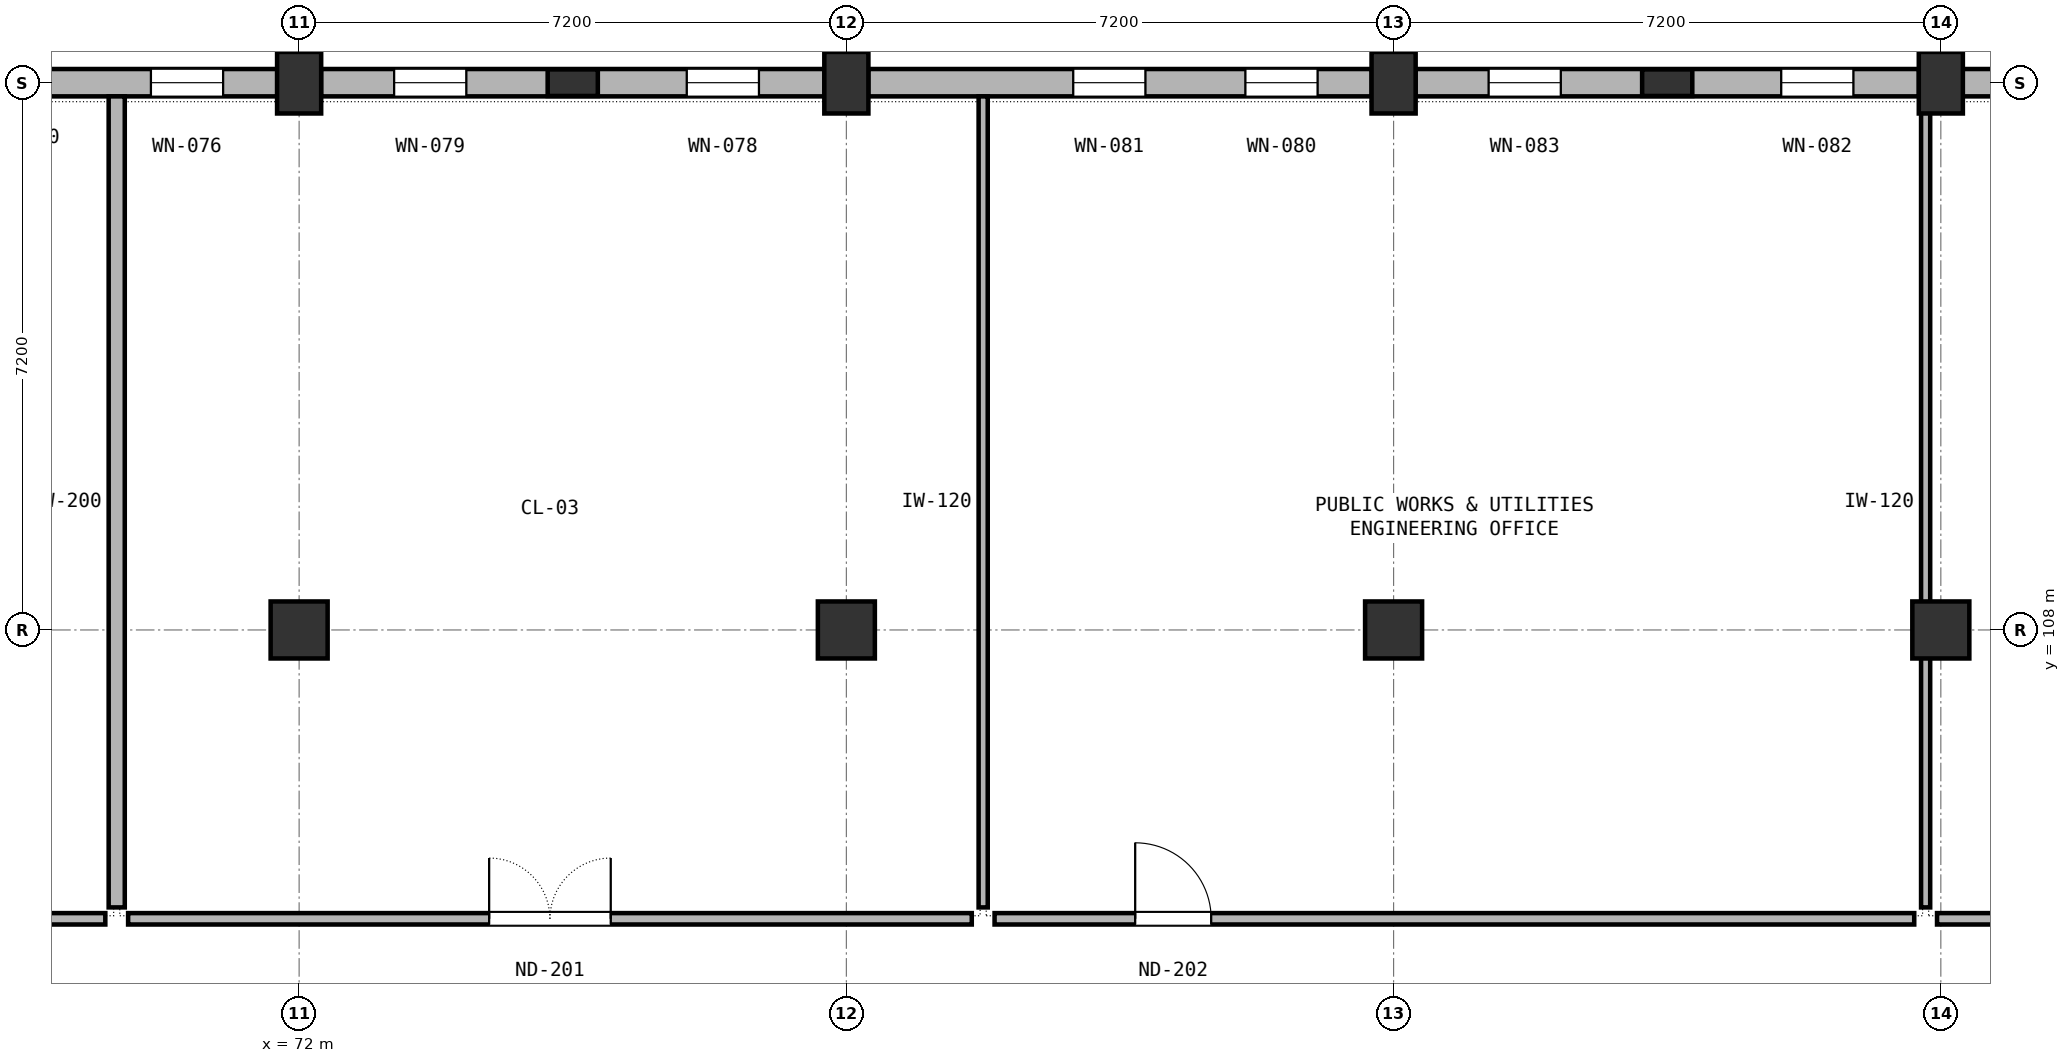
"""IFC4 building model, lengths in metres.
Left out: names, types, materials, properties, quantities, classifications, styles, units other than length and angle.
Written with IfcOpenShell. Run it as: python <this file> out.ifc"""

import sys

from ifc_helpers import new_model, si_unit, direction, frame, frame_2d, origin, origin_2d, place, context, subcontext, project, spatial, rectangle, extrude, element, fill, save


model = new_model("IFC4")
c1 = context("Model", 3, precision=1e-05, world=origin(), true_north=direction((0.0, 1.0)))
c2 = subcontext(c1, "Body", "Model", "MODEL_VIEW")
j1 = project(units=[si_unit("LENGTHUNIT", "METRE"), si_unit("PLANEANGLEUNIT", "RADIAN")], contexts=[c1])
p1 = place(None, origin())
s1 = spatial("IfcSite", under=j1, at=p1, CompositionType="ELEMENT")
p2 = place(p1, origin())
s2 = spatial("IfcBuilding", under=s1, at=p2, CompositionType="ELEMENT")
p3 = place(p2, frame((0.0, 0.0, 14.4)))
s3 = spatial("IfcBuildingStorey", under=s2, at=p3, CompositionType="ELEMENT", Elevation=14.4)
p4 = place(p3, frame((72.0, 108.0, 0.0), z_axis=(0.0, 0.0, 1.0), x_axis=(1.0, 0.0, 0.0)))
e1 = element("IfcColumn", 1, at=p4, inside=s3, PredefinedType="COLUMN", context=c2, shape_type="SweptSolid", body=[
    extrude(rectangle(XDim=0.75, YDim=0.75, at=origin_2d()), origin(), (0.0, 0.0, 1.0), 4.2),
])
p5 = place(p3, frame((72.0, 115.2, 0.0), z_axis=(0.0, 0.0, 1.0), x_axis=(1.0, 0.0, 0.0)))
e2 = element("IfcColumn", 2, at=p5, inside=s3, PredefinedType="COLUMN", context=c2, shape_type="SweptSolid", body=[
    extrude(rectangle(XDim=0.58, YDim=0.81, at=origin_2d()), origin(), (0.0, 0.0, 1.0), 4.2),
])
p6 = place(p3, frame((79.2, 108.0, 0.0), z_axis=(0.0, 0.0, 1.0), x_axis=(1.0, 0.0, 0.0)))
e3 = element("IfcColumn", 3, at=p6, inside=s3, PredefinedType="COLUMN", context=c2, shape_type="SweptSolid", body=[
    extrude(rectangle(XDim=0.75, YDim=0.75, at=origin_2d()), origin(), (0.0, 0.0, 1.0), 4.2),
])
p7 = place(p3, frame((79.2, 115.2, 0.0), z_axis=(0.0, 0.0, 1.0), x_axis=(1.0, 0.0, 0.0)))
e4 = element("IfcColumn", 4, at=p7, inside=s3, PredefinedType="COLUMN", context=c2, shape_type="SweptSolid", body=[
    extrude(rectangle(XDim=0.58, YDim=0.81, at=origin_2d()), origin(), (0.0, 0.0, 1.0), 4.2),
])
p8 = place(p3, frame((86.4, 108.0, 0.0), z_axis=(0.0, 0.0, 1.0), x_axis=(1.0, 0.0, 0.0)))
e5 = element("IfcColumn", 5, at=p8, inside=s3, PredefinedType="COLUMN", context=c2, shape_type="SweptSolid", body=[
    extrude(rectangle(XDim=0.75, YDim=0.75, at=origin_2d()), origin(), (0.0, 0.0, 1.0), 4.2),
])
p9 = place(p3, frame((86.4, 115.2, 0.0), z_axis=(0.0, 0.0, 1.0), x_axis=(1.0, 0.0, 0.0)))
e6 = element("IfcColumn", 6, at=p9, inside=s3, PredefinedType="COLUMN", context=c2, shape_type="SweptSolid", body=[
    extrude(rectangle(XDim=0.58, YDim=0.81, at=origin_2d()), origin(), (0.0, 0.0, 1.0), 4.2),
])
p10 = place(p3, frame((93.6, 108.0, 0.0), z_axis=(0.0, 0.0, 1.0), x_axis=(1.0, 0.0, 0.0)))
e7 = element("IfcColumn", 7, at=p10, inside=s3, PredefinedType="COLUMN", context=c2, shape_type="SweptSolid", body=[
    extrude(rectangle(XDim=0.75, YDim=0.75, at=origin_2d()), origin(), (0.0, 0.0, 1.0), 4.2),
])
p11 = place(p3, frame((93.6, 115.2, 0.0), z_axis=(0.0, 0.0, 1.0), x_axis=(1.0, 0.0, 0.0)))
e8 = element("IfcColumn", 8, at=p11, inside=s3, PredefinedType="COLUMN", context=c2, shape_type="SweptSolid", body=[
    extrude(rectangle(XDim=0.58, YDim=0.81, at=origin_2d()), origin(), (0.0, 0.0, 1.0), 4.2),
])
for number, where, z_axis, x_axis in (
    (9, (75.6, 115.2, 0.0), (0.0, 0.0, 1.0), (1.0, 0.0, 0.0)),
    (10, (90.0, 115.2, 0.0), (0.0, 0.0, 1.0), (1.0, 0.0, 0.0)),
):
    element("IfcColumn", number, at=place(p3, frame(where, z_axis=z_axis, x_axis=x_axis)), inside=s3, PredefinedType="PILASTER", context=c2, shape_type="SweptSolid", body=[
        extrude(rectangle(XDim=0.66, YDim=0.35, at=origin_2d()), origin(), (0.0, 0.0, 1.0), 4.2),
    ])
p12 = place(p3, frame((71.712, 115.2, 0.0), z_axis=(0.0, 0.0, 1.0), x_axis=(-1.0, 0.0, 0.0)))
e11 = element("IfcWall", 11, at=p12, inside=s3, PredefinedType="SOLIDWALL", context=c2, shape_type="SweptSolid", body=[
    extrude(rectangle(XDim=6.624, YDim=0.36, at=frame_2d((3.312, 0.0))), origin(), (0.0, 0.0, 1.0), 3.04),
])
p13 = place(p12, frame((0.712, 0.0, 0.7)))
e12 = element("IfcOpeningElement", 12, at=p13, cuts=e11, PredefinedType="OPENING", context=c2, shape_type="SweptSolid", body=[
    extrude(rectangle(XDim=0.95, YDim=2.14, at=frame_2d((0.475, 1.07))), frame((0.0, 0.19, 0.0), z_axis=(0.0, -1.0, 0.0), x_axis=(1.0, 0.0, 0.0)), (0.0, 0.0, 1.0), 0.38),
])
p14 = place(p12, frame((4.562, 0.0, 0.7)))
e13 = element("IfcOpeningElement", 13, at=p14, cuts=e11, PredefinedType="OPENING", context=c2, shape_type="SweptSolid", body=[
    extrude(rectangle(XDim=0.95, YDim=2.14, at=frame_2d((0.475, 1.07))), frame((0.0, 0.19, 0.0), z_axis=(0.0, -1.0, 0.0), x_axis=(1.0, 0.0, 0.0)), (0.0, 0.0, 1.0), 0.38),
])
p15 = place(p3, frame((78.912, 115.2, 0.0), z_axis=(0.0, 0.0, 1.0), x_axis=(-1.0, 0.0, 0.0)))
e14 = element("IfcWall", 14, at=p15, inside=s3, PredefinedType="SOLIDWALL", context=c2, shape_type="SweptSolid", body=[
    extrude(rectangle(XDim=6.624, YDim=0.36, at=frame_2d((3.312, 0.0))), origin(), (0.0, 0.0, 1.0), 3.04),
])
p16 = place(p15, frame((0.862, 0.0, 0.7)))
e15 = element("IfcOpeningElement", 15, at=p16, cuts=e14, PredefinedType="OPENING", context=c2, shape_type="SweptSolid", body=[
    extrude(rectangle(XDim=0.95, YDim=2.14, at=frame_2d((0.475, 1.07))), frame((0.0, 0.19, 0.0), z_axis=(0.0, -1.0, 0.0), x_axis=(1.0, 0.0, 0.0)), (0.0, 0.0, 1.0), 0.38),
])
p17 = place(p15, frame((4.712, 0.0, 0.7)))
e16 = element("IfcOpeningElement", 16, at=p17, cuts=e14, PredefinedType="OPENING", context=c2, shape_type="SweptSolid", body=[
    extrude(rectangle(XDim=0.95, YDim=2.14, at=frame_2d((0.475, 1.07))), frame((0.0, 0.19, 0.0), z_axis=(0.0, -1.0, 0.0), x_axis=(1.0, 0.0, 0.0)), (0.0, 0.0, 1.0), 0.38),
])
p18 = place(p3, frame((86.112, 115.2, 0.0), z_axis=(0.0, 0.0, 1.0), x_axis=(-1.0, 0.0, 0.0)))
e17 = element("IfcWall", 17, at=p18, inside=s3, PredefinedType="SOLIDWALL", context=c2, shape_type="SweptSolid", body=[
    extrude(rectangle(XDim=6.624, YDim=0.36, at=frame_2d((3.312, 0.0))), origin(), (0.0, 0.0, 1.0), 3.04),
])
p19 = place(p18, frame((0.712, 0.0, 0.7)))
e18 = element("IfcOpeningElement", 18, at=p19, cuts=e17, PredefinedType="OPENING", context=c2, shape_type="SweptSolid", body=[
    extrude(rectangle(XDim=0.95, YDim=2.14, at=frame_2d((0.475, 1.07))), frame((0.0, 0.19, 0.0), z_axis=(0.0, -1.0, 0.0), x_axis=(1.0, 0.0, 0.0)), (0.0, 0.0, 1.0), 0.38),
])
p20 = place(p18, frame((2.977, 0.0, 0.7)))
e19 = element("IfcOpeningElement", 19, at=p20, cuts=e17, PredefinedType="OPENING", context=c2, shape_type="SweptSolid", body=[
    extrude(rectangle(XDim=0.95, YDim=2.14, at=frame_2d((0.475, 1.07))), frame((0.0, 0.19, 0.0), z_axis=(0.0, -1.0, 0.0), x_axis=(1.0, 0.0, 0.0)), (0.0, 0.0, 1.0), 0.38),
])
p21 = place(p3, frame((93.312, 115.2, 0.0), z_axis=(0.0, 0.0, 1.0), x_axis=(-1.0, 0.0, 0.0)))
e20 = element("IfcWall", 20, at=p21, inside=s3, PredefinedType="SOLIDWALL", context=c2, shape_type="SweptSolid", body=[
    extrude(rectangle(XDim=6.624, YDim=0.36, at=frame_2d((3.312, 0.0))), origin(), (0.0, 0.0, 1.0), 3.04),
])
p22 = place(p21, frame((0.862, 0.0, 0.7)))
e21 = element("IfcOpeningElement", 21, at=p22, cuts=e20, PredefinedType="OPENING", context=c2, shape_type="SweptSolid", body=[
    extrude(rectangle(XDim=0.95, YDim=2.14, at=frame_2d((0.475, 1.07))), frame((0.0, 0.19, 0.0), z_axis=(0.0, -1.0, 0.0), x_axis=(1.0, 0.0, 0.0)), (0.0, 0.0, 1.0), 0.38),
])
p23 = place(p21, frame((4.712, 0.0, 0.7)))
e22 = element("IfcOpeningElement", 22, at=p23, cuts=e20, PredefinedType="OPENING", context=c2, shape_type="SweptSolid", body=[
    extrude(rectangle(XDim=0.95, YDim=2.14, at=frame_2d((0.475, 1.07))), frame((0.0, 0.19, 0.0), z_axis=(0.0, -1.0, 0.0), x_axis=(1.0, 0.0, 0.0)), (0.0, 0.0, 1.0), 0.38),
])
p24 = place(p3, frame((100.512, 115.2, 0.0), z_axis=(0.0, 0.0, 1.0), x_axis=(-1.0, 0.0, 0.0)))
e23 = element("IfcWall", 23, at=p24, inside=s3, PredefinedType="SOLIDWALL", context=c2, shape_type="SweptSolid", body=[
    extrude(rectangle(XDim=6.624, YDim=0.36, at=frame_2d((3.312, 0.0))), origin(), (0.0, 0.0, 1.0), 3.04),
])
p25 = place(p24, frame((0.712, 0.0, 0.7)))
e24 = element("IfcOpeningElement", 24, at=p25, cuts=e23, PredefinedType="OPENING", context=c2, shape_type="SweptSolid", body=[
    extrude(rectangle(XDim=0.95, YDim=2.14, at=frame_2d((0.475, 1.07))), frame((0.0, 0.19, 0.0), z_axis=(0.0, -1.0, 0.0), x_axis=(1.0, 0.0, 0.0)), (0.0, 0.0, 1.0), 0.38),
])
p26 = place(p24, frame((4.562, 0.0, 0.7)))
e25 = element("IfcOpeningElement", 25, at=p26, cuts=e23, PredefinedType="OPENING", context=c2, shape_type="SweptSolid", body=[
    extrude(rectangle(XDim=0.95, YDim=2.14, at=frame_2d((0.475, 1.07))), frame((0.0, 0.19, 0.0), z_axis=(0.0, -1.0, 0.0), x_axis=(1.0, 0.0, 0.0)), (0.0, 0.0, 1.0), 0.38),
])
p27 = place(p3, frame((59.15, 104.2, 0.0), z_axis=(0.0, 0.0, 1.0), x_axis=(1.0, 0.0, 0.0)))
e26 = element("IfcWall", 26, at=p27, inside=s3, PredefinedType="PARTITIONING", context=c2, shape_type="SweptSolid", body=[
    extrude(rectangle(XDim=10.3, YDim=0.15, at=frame_2d((5.15, 0.0))), origin(), (0.0, 0.0, 1.0), 3.08),
])
p28 = place(p27, frame((1.85, 0.0, 0.0)))
e27 = element("IfcOpeningElement", 27, at=p28, cuts=e26, PredefinedType="OPENING", context=c2, shape_type="SweptSolid", body=[
    extrude(rectangle(XDim=1.0, YDim=2.15, at=frame_2d((0.5, 1.075))), frame((0.0, 0.085, 0.0), z_axis=(0.0, -1.0, 0.0), x_axis=(1.0, 0.0, 0.0)), (0.0, 0.0, 1.0), 0.17),
])
p29 = place(p3, frame((69.75, 104.2, 0.0), z_axis=(0.0, 0.0, 1.0), x_axis=(1.0, 0.0, 0.0)))
e28 = element("IfcWall", 28, at=p29, inside=s3, PredefinedType="PARTITIONING", context=c2, shape_type="SweptSolid", body=[
    extrude(rectangle(XDim=11.1, YDim=0.15, at=frame_2d((5.55, 0.0))), origin(), (0.0, 0.0, 1.0), 3.08),
])
p30 = place(p29, frame((4.75, 0.0, 0.0)))
e29 = element("IfcOpeningElement", 29, at=p30, cuts=e28, PredefinedType="OPENING", context=c2, shape_type="SweptSolid", body=[
    extrude(rectangle(XDim=1.6, YDim=2.2, at=frame_2d((0.8, 1.1))), frame((0.0, 0.085, 0.0), z_axis=(0.0, -1.0, 0.0), x_axis=(1.0, 0.0, 0.0)), (0.0, 0.0, 1.0), 0.17),
])
p31 = place(p3, frame((69.6, 104.35, 0.0), z_axis=(0.0, 0.0, 1.0), x_axis=(0.0, 1.0, 0.0)))
e30 = element("IfcWall", 30, at=p31, inside=s3, PredefinedType="PARTITIONING", context=c2, shape_type="SweptSolid", body=[
    extrude(rectangle(XDim=10.67, YDim=0.212, at=frame_2d((5.335, 0.0))), origin(), (0.0, 0.0, 1.0), 3.08),
])
p32 = place(p3, frame((81.15, 104.2, 0.0), z_axis=(0.0, 0.0, 1.0), x_axis=(1.0, 0.0, 0.0)))
e31 = element("IfcWall", 31, at=p32, inside=s3, PredefinedType="PARTITIONING", context=c2, shape_type="SweptSolid", body=[
    extrude(rectangle(XDim=12.1, YDim=0.15, at=frame_2d((6.05, 0.0))), origin(), (0.0, 0.0, 1.0), 3.08),
])
p33 = place(p32, frame((1.85, 0.0, 0.0)))
e32 = element("IfcOpeningElement", 32, at=p33, cuts=e31, PredefinedType="OPENING", context=c2, shape_type="SweptSolid", body=[
    extrude(rectangle(XDim=1.0, YDim=2.15, at=frame_2d((0.5, 1.075))), frame((0.0, 0.085, 0.0), z_axis=(0.0, -1.0, 0.0), x_axis=(1.0, 0.0, 0.0)), (0.0, 0.0, 1.0), 0.17),
])
p34 = place(p3, frame((81.0, 104.35, 0.0), z_axis=(0.0, 0.0, 1.0), x_axis=(0.0, 1.0, 0.0)))
e33 = element("IfcWall", 33, at=p34, inside=s3, PredefinedType="PARTITIONING", context=c2, shape_type="SweptSolid", body=[
    extrude(rectangle(XDim=10.67, YDim=0.12, at=frame_2d((5.335, 0.0))), origin(), (0.0, 0.0, 1.0), 3.08),
])
p35 = place(p3, frame((93.55, 104.2, 0.0), z_axis=(0.0, 0.0, 1.0), x_axis=(1.0, 0.0, 0.0)))
e34 = element("IfcWall", 34, at=p35, inside=s3, PredefinedType="PARTITIONING", context=c2, shape_type="SweptSolid", body=[
    extrude(rectangle(XDim=6.5, YDim=0.15, at=frame_2d((3.25, 0.0))), origin(), (0.0, 0.0, 1.0), 3.08),
])
p36 = place(p35, frame((2.725, 0.0, 0.0)))
e35 = element("IfcOpeningElement", 35, at=p36, cuts=e34, PredefinedType="OPENING", context=c2, shape_type="SweptSolid", body=[
    extrude(rectangle(XDim=1.05, YDim=2.15, at=frame_2d((0.525, 1.075))), frame((0.0, 0.085, 0.0), z_axis=(0.0, -1.0, 0.0), x_axis=(1.0, 0.0, 0.0)), (0.0, 0.0, 1.0), 0.17),
])
p37 = place(p3, frame((93.4, 104.35, 0.0), z_axis=(0.0, 0.0, 1.0), x_axis=(0.0, 1.0, 0.0)))
e36 = element("IfcWall", 36, at=p37, inside=s3, PredefinedType="PARTITIONING", context=c2, shape_type="SweptSolid", body=[
    extrude(rectangle(XDim=10.67, YDim=0.12, at=frame_2d((5.335, 0.0))), origin(), (0.0, 0.0, 1.0), 3.08),
])
p38 = place(p13, origin())
e37 = element("IfcWindow", 37, at=p38, inside=s3, PartitioningType="SINGLE_PANEL", PredefinedType="WINDOW", context=c2, shape_type="SweptSolid", body=[
    extrude(rectangle(XDim=0.95, YDim=2.14, at=frame_2d((0.475, 1.07))), frame((0.0, 0.03, 0.0), z_axis=(0.0, -1.0, 0.0), x_axis=(1.0, 0.0, 0.0)), (0.0, 0.0, 1.0), 0.06),
])
fill(e12, e37)
p39 = place(p16, origin())
e38 = element("IfcWindow", 38, at=p39, inside=s3, PartitioningType="SINGLE_PANEL", PredefinedType="WINDOW", context=c2, shape_type="SweptSolid", body=[
    extrude(rectangle(XDim=0.95, YDim=2.14, at=frame_2d((0.475, 1.07))), frame((0.0, 0.03, 0.0), z_axis=(0.0, -1.0, 0.0), x_axis=(1.0, 0.0, 0.0)), (0.0, 0.0, 1.0), 0.06),
])
fill(e15, e38)
p40 = place(p17, origin())
e39 = element("IfcWindow", 39, at=p40, inside=s3, PartitioningType="SINGLE_PANEL", PredefinedType="WINDOW", context=c2, shape_type="SweptSolid", body=[
    extrude(rectangle(XDim=0.95, YDim=2.14, at=frame_2d((0.475, 1.07))), frame((0.0, 0.03, 0.0), z_axis=(0.0, -1.0, 0.0), x_axis=(1.0, 0.0, 0.0)), (0.0, 0.0, 1.0), 0.06),
])
fill(e16, e39)
p41 = place(p19, origin())
e40 = element("IfcWindow", 40, at=p41, inside=s3, PartitioningType="SINGLE_PANEL", PredefinedType="WINDOW", context=c2, shape_type="SweptSolid", body=[
    extrude(rectangle(XDim=0.95, YDim=2.14, at=frame_2d((0.475, 1.07))), frame((0.0, 0.03, 0.0), z_axis=(0.0, -1.0, 0.0), x_axis=(1.0, 0.0, 0.0)), (0.0, 0.0, 1.0), 0.06),
])
fill(e18, e40)
p42 = place(p20, origin())
e41 = element("IfcWindow", 41, at=p42, inside=s3, PartitioningType="SINGLE_PANEL", PredefinedType="WINDOW", context=c2, shape_type="SweptSolid", body=[
    extrude(rectangle(XDim=0.95, YDim=2.14, at=frame_2d((0.475, 1.07))), frame((0.0, 0.03, 0.0), z_axis=(0.0, -1.0, 0.0), x_axis=(1.0, 0.0, 0.0)), (0.0, 0.0, 1.0), 0.06),
])
fill(e19, e41)
p43 = place(p22, origin())
e42 = element("IfcWindow", 42, at=p43, inside=s3, PartitioningType="SINGLE_PANEL", PredefinedType="WINDOW", context=c2, shape_type="SweptSolid", body=[
    extrude(rectangle(XDim=0.95, YDim=2.14, at=frame_2d((0.475, 1.07))), frame((0.0, 0.03, 0.0), z_axis=(0.0, -1.0, 0.0), x_axis=(1.0, 0.0, 0.0)), (0.0, 0.0, 1.0), 0.06),
])
fill(e21, e42)
p44 = place(p23, origin())
e43 = element("IfcWindow", 43, at=p44, inside=s3, PartitioningType="SINGLE_PANEL", PredefinedType="WINDOW", context=c2, shape_type="SweptSolid", body=[
    extrude(rectangle(XDim=0.95, YDim=2.14, at=frame_2d((0.475, 1.07))), frame((0.0, 0.03, 0.0), z_axis=(0.0, -1.0, 0.0), x_axis=(1.0, 0.0, 0.0)), (0.0, 0.0, 1.0), 0.06),
])
fill(e22, e43)
p45 = place(p30, origin())
e44 = element("IfcDoor", 44, at=p45, inside=s3, OperationType="DOUBLE_DOOR_SINGLE_SWING", PredefinedType="DOOR", context=c2, shape_type="SweptSolid", body=[
    extrude(rectangle(XDim=1.6, YDim=2.2, at=frame_2d((0.8, 1.1))), frame((0.0, 0.025, 0.0), z_axis=(0.0, -1.0, 0.0), x_axis=(1.0, 0.0, 0.0)), (0.0, 0.0, 1.0), 0.05),
])
fill(e29, e44)
p46 = place(p33, origin())
e45 = element("IfcDoor", 45, at=p46, inside=s3, OperationType="SINGLE_SWING_LEFT", PredefinedType="DOOR", context=c2, shape_type="SweptSolid", body=[
    extrude(rectangle(XDim=1.0, YDim=2.15, at=frame_2d((0.5, 1.075))), frame((0.0, 0.025, 0.0), z_axis=(0.0, -1.0, 0.0), x_axis=(1.0, 0.0, 0.0)), (0.0, 0.0, 1.0), 0.05),
])
fill(e32, e45)
save(model, sys.argv[1])
